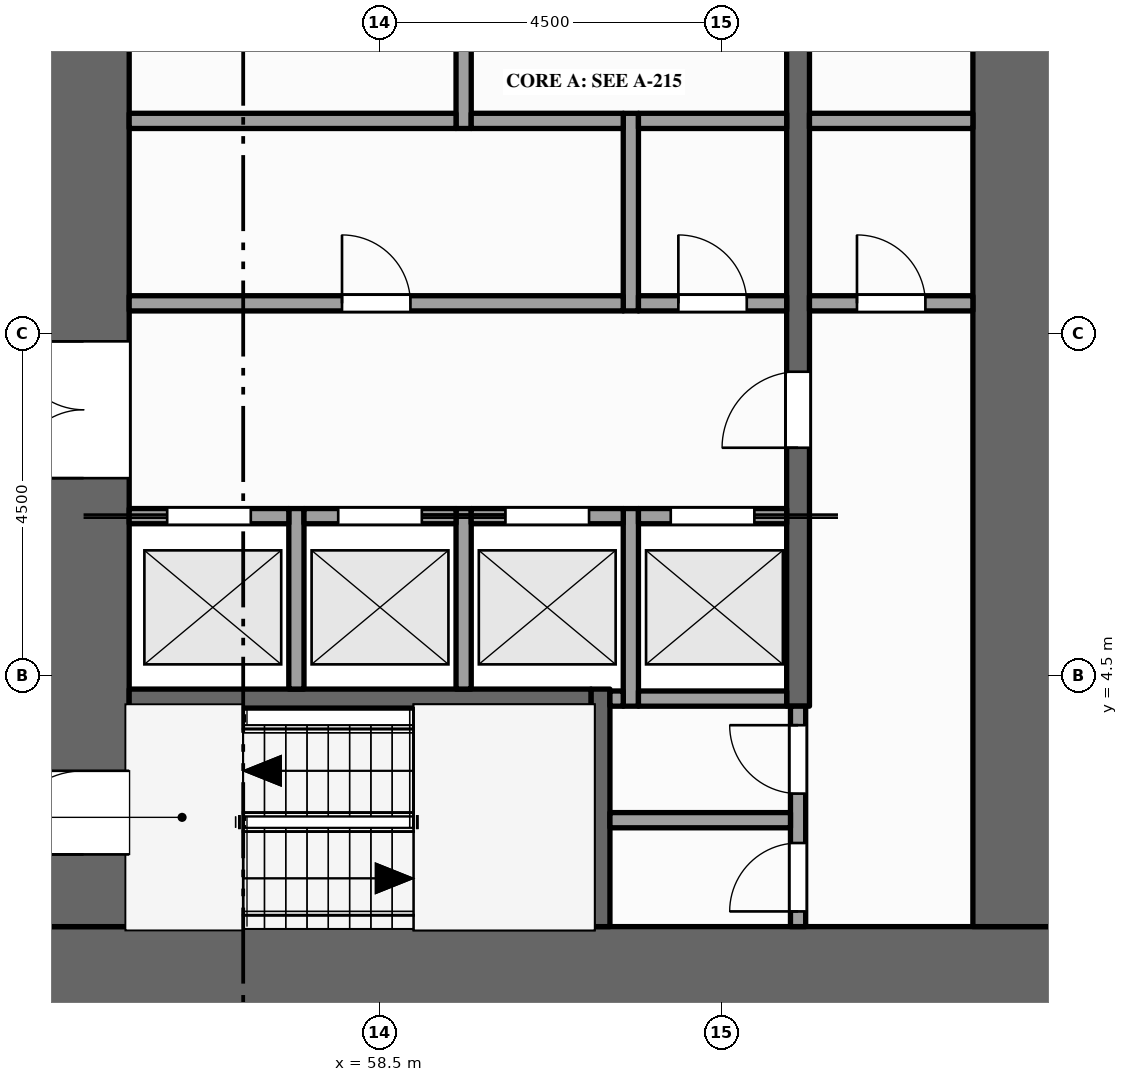
"""IFC4 building model, lengths in metres.
Left out: names, types, materials, properties, quantities, classifications, styles, units other than length and angle.
Written with IfcOpenShell. Run it as: python <this file> out.ifc"""

import sys

from ifc_helpers import new_model, si_unit, direction, frame, frame_2d, origin, place, context, subcontext, project, spatial, rectangle, extrude, element, fill, save


model = new_model("IFC4")
c1 = context("Model", 3, precision=1e-05, world=origin(), true_north=direction((0.0, 1.0)))
c2 = subcontext(c1, "Body", "Model", "MODEL_VIEW")
j1 = project(units=[si_unit("LENGTHUNIT", "METRE"), si_unit("PLANEANGLEUNIT", "RADIAN")], contexts=[c1])
p1 = place(None, origin())
s1 = spatial("IfcSite", under=j1, at=p1, CompositionType="ELEMENT")
p2 = place(p1, origin())
s2 = spatial("IfcBuilding", under=s1, at=p2, CompositionType="ELEMENT")
p3 = place(p2, frame((0.0, 0.0, 77.0)))
s3 = spatial("IfcBuildingStorey", under=s2, at=p3, CompositionType="ELEMENT", Elevation=77.0)
p4 = place(p3, frame((67.5, 0.6, -0.15), z_axis=(0.0, 0.0, 1.0), x_axis=(-1.0, 0.0, 0.0)))
e1 = element("IfcWall", 1, at=p4, inside=s3, PredefinedType="SHEAR", context=c2, shape_type="SweptSolid", body=[
    extrude(rectangle(XDim=13.5, YDim=1.2, at=frame_2d((6.75, 0.0))), origin(), (0.0, 0.0, 1.0), 6.0),
])
p5 = place(p3, frame((54.6, 1.2, -0.15), z_axis=(0.0, 0.0, 1.0), x_axis=(0.0, 1.0, 0.0)))
e2 = element("IfcWall", 2, at=p5, inside=s3, PredefinedType="SHEAR", context=c2, shape_type="SweptSolid", body=[
    extrude(rectangle(XDim=20.1, YDim=1.2, at=frame_2d((10.05, 0.0))), origin(), (0.0, 0.0, 1.0), 6.0),
])
p6 = place(p5, frame((5.9, 0.0, 0.15)))
e3 = element("IfcOpeningElement", 3, at=p6, cuts=e2, PredefinedType="OPENING", context=c2, shape_type="SweptSolid", body=[
    extrude(rectangle(XDim=1.8, YDim=2.1, at=frame_2d((0.9, 1.05))), frame((0.0, 0.61, 0.0), z_axis=(0.0, -1.0, 0.0), x_axis=(1.0, 0.0, 0.0)), (0.0, 0.0, 1.0), 1.22),
])
p7 = place(p5, frame((11.95, 0.0, 0.15)))
e4 = element("IfcOpeningElement", 4, at=p7, cuts=e2, PredefinedType="OPENING", context=c2, shape_type="SweptSolid", body=[
    extrude(rectangle(XDim=1.1, YDim=2.1, at=frame_2d((0.55, 1.05))), frame((0.0, 0.61, 0.0), z_axis=(0.0, -1.0, 0.0), x_axis=(1.0, 0.0, 0.0)), (0.0, 0.0, 1.0), 1.22),
])
p8 = place(p5, frame((0.95, 0.0, 0.15)))
e5 = element("IfcOpeningElement", 5, at=p8, cuts=e2, PredefinedType="OPENING", context=c2, shape_type="SweptSolid", body=[
    extrude(rectangle(XDim=1.1, YDim=2.1, at=frame_2d((0.55, 1.05))), frame((0.0, 0.61, 0.0), z_axis=(0.0, -1.0, 0.0), x_axis=(1.0, 0.0, 0.0)), (0.0, 0.0, 1.0), 1.22),
])
p9 = place(p5, frame((18.15, 0.0, 0.15)))
e6 = element("IfcOpeningElement", 6, at=p9, cuts=e2, PredefinedType="OPENING", context=c2, shape_type="SweptSolid", body=[
    extrude(rectangle(XDim=1.1, YDim=2.1, at=frame_2d((0.55, 1.05))), frame((0.0, 0.61, 0.0), z_axis=(0.0, -1.0, 0.0), x_axis=(1.0, 0.0, 0.0)), (0.0, 0.0, 1.0), 1.22),
])
p10 = place(p3, frame((66.9, 1.2, -0.15), z_axis=(0.0, 0.0, 1.0), x_axis=(0.0, 1.0, 0.0)))
e7 = element("IfcWall", 7, at=p10, inside=s3, PredefinedType="SHEAR", context=c2, shape_type="SweptSolid", body=[
    extrude(rectangle(XDim=20.1, YDim=1.2, at=frame_2d((10.05, 0.0))), origin(), (0.0, 0.0, 1.0), 6.0),
])
for number, where, z_axis, x_axis in (
    (8, (57.4, 4.325, 0.0), (0.0, 0.0, 1.0), (0.0, 1.0, 0.0)),
    (9, (59.6, 4.325, 0.0), (0.0, 0.0, 1.0), (0.0, 1.0, 0.0)),
):
    element("IfcWall", number, at=place(p3, frame(where, z_axis=z_axis, x_axis=x_axis)), inside=s3, PredefinedType="SOLIDWALL", context=c2, shape_type="SweptSolid", body=[
        extrude(rectangle(XDim=2.375, YDim=0.2, at=frame_2d((1.188, 0.0))), origin(), (0.0, 0.0, 1.0), 5.85),
    ])
p11 = place(p3, frame((59.6, 11.7, 0.0), z_axis=(0.0, 0.0, 1.0), x_axis=(0.0, 1.0, 0.0)))
e10 = element("IfcWall", 10, at=p11, inside=s3, PredefinedType="PARTITIONING", context=c2, shape_type="SweptSolid", body=[
    extrude(rectangle(XDim=3.8, YDim=0.2, at=frame_2d((1.9, 0.0))), origin(), (0.0, 0.0, 1.0), 5.85),
])
p12 = place(p11, frame((1.5, 0.0, 0.0)))
e11 = element("IfcOpeningElement", 11, at=p12, cuts=e10, PredefinedType="OPENING", context=c2, shape_type="SweptSolid", body=[
    extrude(rectangle(XDim=1.0, YDim=2.1, at=frame_2d((0.5, 1.05))), frame((0.0, 0.11, 0.0), z_axis=(0.0, -1.0, 0.0), x_axis=(1.0, 0.0, 0.0)), (0.0, 0.0, 1.0), 0.22),
])
p13 = place(p3, frame((61.4, 1.2, 0.0), z_axis=(0.0, 0.0, 1.0), x_axis=(0.0, 1.0, 0.0)))
e12 = element("IfcWall", 12, at=p13, inside=s3, PredefinedType="SHEAR", context=c2, shape_type="SweptSolid", body=[
    extrude(rectangle(XDim=3.125, YDim=0.25, at=frame_2d((1.562, 0.0))), origin(), (0.0, 0.0, 1.0), 5.85),
])
p14 = place(p3, frame((61.8, 4.1, 0.0), z_axis=(0.0, 0.0, 1.0), x_axis=(0.0, 1.0, 0.0)))
e13 = element("IfcWall", 13, at=p14, inside=s3, PredefinedType="SOLIDWALL", context=c2, shape_type="SweptSolid", body=[
    extrude(rectangle(XDim=2.6, YDim=0.2, at=frame_2d((1.3, 0.0))), origin(), (0.0, 0.0, 1.0), 5.85),
])
p15 = place(p3, frame((61.8, 9.3, 0.0), z_axis=(0.0, 0.0, 1.0), x_axis=(0.0, 1.0, 0.0)))
e14 = element("IfcWall", 14, at=p15, inside=s3, PredefinedType="PARTITIONING", context=c2, shape_type="SweptSolid", body=[
    extrude(rectangle(XDim=2.6, YDim=0.2, at=frame_2d((1.3, 0.0))), origin(), (0.0, 0.0, 1.0), 5.85),
])
p16 = place(p3, frame((64.0, 1.2, 0.0), z_axis=(0.0, 0.0, 1.0), x_axis=(0.0, 1.0, 0.0)))
e15 = element("IfcWall", 15, at=p16, inside=s3, PredefinedType="PARTITIONING", context=c2, shape_type="SweptSolid", body=[
    extrude(rectangle(XDim=2.9, YDim=0.2, at=frame_2d((1.45, 0.0))), origin(), (0.0, 0.0, 1.0), 5.85),
])
p17 = place(p16, frame((0.2, 0.0, 0.0)))
e16 = element("IfcOpeningElement", 16, at=p17, cuts=e15, PredefinedType="OPENING", context=c2, shape_type="SweptSolid", body=[
    extrude(rectangle(XDim=0.9, YDim=2.1, at=frame_2d((0.45, 1.05))), frame((0.0, 0.11, 0.0), z_axis=(0.0, -1.0, 0.0), x_axis=(1.0, 0.0, 0.0)), (0.0, 0.0, 1.0), 0.22),
])
p18 = place(p16, frame((1.75, 0.0, 0.0)))
e17 = element("IfcOpeningElement", 17, at=p18, cuts=e15, PredefinedType="OPENING", context=c2, shape_type="SweptSolid", body=[
    extrude(rectangle(XDim=0.9, YDim=2.1, at=frame_2d((0.45, 1.05))), frame((0.0, 0.11, 0.0), z_axis=(0.0, -1.0, 0.0), x_axis=(1.0, 0.0, 0.0)), (0.0, 0.0, 1.0), 0.22),
])
p19 = place(p3, frame((64.0, 4.1, 0.0), z_axis=(0.0, 0.0, 1.0), x_axis=(0.0, 1.0, 0.0)))
e18 = element("IfcWall", 18, at=p19, inside=s3, PredefinedType="SHEAR", context=c2, shape_type="SweptSolid", body=[
    extrude(rectangle(XDim=14.5, YDim=0.3, at=frame_2d((7.25, 0.0))), origin(), (0.0, 0.0, 1.0), 5.85),
])
p20 = place(p19, frame((3.4, 0.0, 0.0)))
e19 = element("IfcOpeningElement", 19, at=p20, cuts=e18, PredefinedType="OPENING", context=c2, shape_type="SweptSolid", body=[
    extrude(rectangle(XDim=1.0, YDim=2.1, at=frame_2d((0.5, 1.05))), frame((0.0, 0.16, 0.0), z_axis=(0.0, -1.0, 0.0), x_axis=(1.0, 0.0, 0.0)), (0.0, 0.0, 1.0), 0.32),
])
p21 = place(p19, frame((9.1, 0.0, 0.0)))
e20 = element("IfcOpeningElement", 20, at=p21, cuts=e18, PredefinedType="OPENING", context=c2, shape_type="SweptSolid", body=[
    extrude(rectangle(XDim=1.0, YDim=2.1, at=frame_2d((0.5, 1.05))), frame((0.0, 0.16, 0.0), z_axis=(0.0, -1.0, 0.0), x_axis=(1.0, 0.0, 0.0)), (0.0, 0.0, 1.0), 0.32),
])
p22 = place(p3, frame((61.525, 2.6, 0.0), z_axis=(0.0, 0.0, 1.0), x_axis=(1.0, 0.0, 0.0)))
e21 = element("IfcWall", 21, at=p22, inside=s3, PredefinedType="PARTITIONING", context=c2, shape_type="SweptSolid", body=[
    extrude(rectangle(XDim=2.375, YDim=0.2, at=frame_2d((1.188, 0.0))), origin(), (0.0, 0.0, 1.0), 5.85),
])
p23 = place(p3, frame((55.2, 4.2, 0.0), z_axis=(0.0, 0.0, 1.0), x_axis=(1.0, 0.0, 0.0)))
e22 = element("IfcWall", 22, at=p23, inside=s3, PredefinedType="SHEAR", context=c2, shape_type="SweptSolid", body=[
    extrude(rectangle(XDim=6.075, YDim=0.25, at=frame_2d((3.038, 0.0))), origin(), (0.0, 0.0, 1.0), 5.85),
])
p24 = place(p3, frame((61.525, 4.2, 0.0), z_axis=(0.0, 0.0, 1.0), x_axis=(1.0, 0.0, 0.0)))
e23 = element("IfcWall", 23, at=p24, inside=s3, PredefinedType="SOLIDWALL", context=c2, shape_type="SweptSolid", body=[
    extrude(rectangle(XDim=0.175, YDim=0.2, at=frame_2d((0.087, 0.0))), origin(), (0.0, 0.0, 1.0), 5.85),
])
p25 = place(p3, frame((61.9, 4.2, 0.0), z_axis=(0.0, 0.0, 1.0), x_axis=(1.0, 0.0, 0.0)))
e24 = element("IfcWall", 24, at=p25, inside=s3, PredefinedType="SOLIDWALL", context=c2, shape_type="SweptSolid", body=[
    extrude(rectangle(XDim=1.95, YDim=0.2, at=frame_2d((0.975, 0.0))), origin(), (0.0, 0.0, 1.0), 5.85),
])
p26 = place(p3, frame((55.2, 6.6, 0.0), z_axis=(0.0, 0.0, 1.0), x_axis=(1.0, 0.0, 0.0)))
e25 = element("IfcWall", 25, at=p26, inside=s3, PredefinedType="SOLIDWALL", context=c2, shape_type="SweptSolid", body=[
    extrude(rectangle(XDim=2.1, YDim=0.2, at=frame_2d((1.05, 0.0))), origin(), (0.0, 0.0, 1.0), 5.85),
])
p27 = place(p26, frame((0.5, 0.0, 0.012)))
e26 = element("IfcOpeningElement", 26, at=p27, cuts=e25, PredefinedType="OPENING", context=c2, shape_type="SweptSolid", body=[
    extrude(rectangle(XDim=1.1, YDim=2.1, at=frame_2d((0.55, 1.05))), frame((0.0, 0.11, 0.0), z_axis=(0.0, -1.0, 0.0), x_axis=(1.0, 0.0, 0.0)), (0.0, 0.0, 1.0), 0.22),
])
p28 = place(p3, frame((57.5, 6.6, 0.0), z_axis=(0.0, 0.0, 1.0), x_axis=(1.0, 0.0, 0.0)))
e27 = element("IfcWall", 27, at=p28, inside=s3, PredefinedType="SOLIDWALL", context=c2, shape_type="SweptSolid", body=[
    extrude(rectangle(XDim=2.0, YDim=0.2, at=frame_2d((1.0, 0.0))), origin(), (0.0, 0.0, 1.0), 5.85),
])
p29 = place(p28, frame((0.45, 0.0, 0.012)))
e28 = element("IfcOpeningElement", 28, at=p29, cuts=e27, PredefinedType="OPENING", context=c2, shape_type="SweptSolid", body=[
    extrude(rectangle(XDim=1.1, YDim=2.1, at=frame_2d((0.55, 1.05))), frame((0.0, 0.11, 0.0), z_axis=(0.0, -1.0, 0.0), x_axis=(1.0, 0.0, 0.0)), (0.0, 0.0, 1.0), 0.22),
])
p30 = place(p3, frame((59.7, 6.6, 0.0), z_axis=(0.0, 0.0, 1.0), x_axis=(1.0, 0.0, 0.0)))
e29 = element("IfcWall", 29, at=p30, inside=s3, PredefinedType="SOLIDWALL", context=c2, shape_type="SweptSolid", body=[
    extrude(rectangle(XDim=2.0, YDim=0.2, at=frame_2d((1.0, 0.0))), origin(), (0.0, 0.0, 1.0), 5.85),
])
p31 = place(p30, frame((0.45, 0.0, 0.012)))
e30 = element("IfcOpeningElement", 30, at=p31, cuts=e29, PredefinedType="OPENING", context=c2, shape_type="SweptSolid", body=[
    extrude(rectangle(XDim=1.1, YDim=2.1, at=frame_2d((0.55, 1.05))), frame((0.0, 0.11, 0.0), z_axis=(0.0, -1.0, 0.0), x_axis=(1.0, 0.0, 0.0)), (0.0, 0.0, 1.0), 0.22),
])
p32 = place(p3, frame((61.9, 6.6, 0.0), z_axis=(0.0, 0.0, 1.0), x_axis=(1.0, 0.0, 0.0)))
e31 = element("IfcWall", 31, at=p32, inside=s3, PredefinedType="SOLIDWALL", context=c2, shape_type="SweptSolid", body=[
    extrude(rectangle(XDim=1.95, YDim=0.2, at=frame_2d((0.975, 0.0))), origin(), (0.0, 0.0, 1.0), 5.85),
])
p33 = place(p32, frame((0.425, 0.0, 0.012)))
e32 = element("IfcOpeningElement", 32, at=p33, cuts=e31, PredefinedType="OPENING", context=c2, shape_type="SweptSolid", body=[
    extrude(rectangle(XDim=1.1, YDim=2.1, at=frame_2d((0.55, 1.05))), frame((0.0, 0.11, 0.0), z_axis=(0.0, -1.0, 0.0), x_axis=(1.0, 0.0, 0.0)), (0.0, 0.0, 1.0), 0.22),
])
p34 = place(p3, frame((55.2, 9.4, 0.0), z_axis=(0.0, 0.0, 1.0), x_axis=(1.0, 0.0, 0.0)))
e33 = element("IfcWall", 33, at=p34, inside=s3, PredefinedType="PARTITIONING", context=c2, shape_type="SweptSolid", body=[
    extrude(rectangle(XDim=6.5, YDim=0.2, at=frame_2d((3.25, 0.0))), origin(), (0.0, 0.0, 1.0), 5.85),
])
p35 = place(p34, frame((2.8, 0.0, 0.0)))
e34 = element("IfcOpeningElement", 34, at=p35, cuts=e33, PredefinedType="OPENING", context=c2, shape_type="SweptSolid", body=[
    extrude(rectangle(XDim=0.9, YDim=2.1, at=frame_2d((0.45, 1.05))), frame((0.0, 0.11, 0.0), z_axis=(0.0, -1.0, 0.0), x_axis=(1.0, 0.0, 0.0)), (0.0, 0.0, 1.0), 0.22),
])
p36 = place(p3, frame((61.9, 9.4, 0.0), z_axis=(0.0, 0.0, 1.0), x_axis=(1.0, 0.0, 0.0)))
e35 = element("IfcWall", 35, at=p36, inside=s3, PredefinedType="PARTITIONING", context=c2, shape_type="SweptSolid", body=[
    extrude(rectangle(XDim=1.95, YDim=0.2, at=frame_2d((0.975, 0.0))), origin(), (0.0, 0.0, 1.0), 5.85),
])
p37 = place(p36, frame((0.525, 0.0, 0.0)))
e36 = element("IfcOpeningElement", 36, at=p37, cuts=e35, PredefinedType="OPENING", context=c2, shape_type="SweptSolid", body=[
    extrude(rectangle(XDim=0.9, YDim=2.1, at=frame_2d((0.45, 1.05))), frame((0.0, 0.11, 0.0), z_axis=(0.0, -1.0, 0.0), x_axis=(1.0, 0.0, 0.0)), (0.0, 0.0, 1.0), 0.22),
])
p38 = place(p3, frame((64.15, 9.4, 0.0), z_axis=(0.0, 0.0, 1.0), x_axis=(1.0, 0.0, 0.0)))
e37 = element("IfcWall", 37, at=p38, inside=s3, PredefinedType="PARTITIONING", context=c2, shape_type="SweptSolid", body=[
    extrude(rectangle(XDim=2.15, YDim=0.2, at=frame_2d((1.075, 0.0))), origin(), (0.0, 0.0, 1.0), 5.85),
])
p39 = place(p38, frame((0.625, 0.0, 0.0)))
e38 = element("IfcOpeningElement", 38, at=p39, cuts=e37, PredefinedType="OPENING", context=c2, shape_type="SweptSolid", body=[
    extrude(rectangle(XDim=0.9, YDim=2.1, at=frame_2d((0.45, 1.05))), frame((0.0, 0.11, 0.0), z_axis=(0.0, -1.0, 0.0), x_axis=(1.0, 0.0, 0.0)), (0.0, 0.0, 1.0), 0.22),
])
p40 = place(p3, frame((55.2, 11.8, 0.0), z_axis=(0.0, 0.0, 1.0), x_axis=(1.0, 0.0, 0.0)))
e39 = element("IfcWall", 39, at=p40, inside=s3, PredefinedType="PARTITIONING", context=c2, shape_type="SweptSolid", body=[
    extrude(rectangle(XDim=4.3, YDim=0.2, at=frame_2d((2.15, 0.0))), origin(), (0.0, 0.0, 1.0), 5.85),
])
p41 = place(p3, frame((59.7, 11.8, 0.0), z_axis=(0.0, 0.0, 1.0), x_axis=(1.0, 0.0, 0.0)))
e40 = element("IfcWall", 40, at=p41, inside=s3, PredefinedType="PARTITIONING", context=c2, shape_type="SweptSolid", body=[
    extrude(rectangle(XDim=2.0, YDim=0.2, at=frame_2d((1.0, 0.0))), origin(), (0.0, 0.0, 1.0), 5.85),
])
p42 = place(p3, frame((61.9, 11.8, 0.0), z_axis=(0.0, 0.0, 1.0), x_axis=(1.0, 0.0, 0.0)))
e41 = element("IfcWall", 41, at=p42, inside=s3, PredefinedType="PARTITIONING", context=c2, shape_type="SweptSolid", body=[
    extrude(rectangle(XDim=1.95, YDim=0.2, at=frame_2d((0.975, 0.0))), origin(), (0.0, 0.0, 1.0), 5.85),
])
p43 = place(p3, frame((64.15, 11.8, 0.0), z_axis=(0.0, 0.0, 1.0), x_axis=(1.0, 0.0, 0.0)))
e42 = element("IfcWall", 42, at=p43, inside=s3, PredefinedType="PARTITIONING", context=c2, shape_type="SweptSolid", body=[
    extrude(rectangle(XDim=2.15, YDim=0.2, at=frame_2d((1.075, 0.0))), origin(), (0.0, 0.0, 1.0), 5.85),
])
p44 = place(p27, origin())
e43 = element("IfcDoor", 43, at=p44, inside=s3, OperationType="SLIDING_TO_LEFT", PredefinedType="DOOR", context=c2, shape_type="SweptSolid", body=[
    extrude(rectangle(XDim=1.1, YDim=2.1, at=frame_2d((0.55, 1.05))), frame((0.0, 0.025, 0.0), z_axis=(0.0, -1.0, 0.0), x_axis=(1.0, 0.0, 0.0)), (0.0, 0.0, 1.0), 0.05),
])
fill(e26, e43)
p45 = place(p29, origin())
e44 = element("IfcDoor", 44, at=p45, inside=s3, OperationType="SLIDING_TO_RIGHT", PredefinedType="DOOR", context=c2, shape_type="SweptSolid", body=[
    extrude(rectangle(XDim=1.1, YDim=2.1, at=frame_2d((0.55, 1.05))), frame((0.0, 0.025, 0.0), z_axis=(0.0, -1.0, 0.0), x_axis=(1.0, 0.0, 0.0)), (0.0, 0.0, 1.0), 0.05),
])
fill(e28, e44)
p46 = place(p31, origin())
e45 = element("IfcDoor", 45, at=p46, inside=s3, OperationType="SLIDING_TO_LEFT", PredefinedType="DOOR", context=c2, shape_type="SweptSolid", body=[
    extrude(rectangle(XDim=1.1, YDim=2.1, at=frame_2d((0.55, 1.05))), frame((0.0, 0.025, 0.0), z_axis=(0.0, -1.0, 0.0), x_axis=(1.0, 0.0, 0.0)), (0.0, 0.0, 1.0), 0.05),
])
fill(e30, e45)
p47 = place(p33, origin())
e46 = element("IfcDoor", 46, at=p47, inside=s3, OperationType="SLIDING_TO_RIGHT", PredefinedType="DOOR", context=c2, shape_type="SweptSolid", body=[
    extrude(rectangle(XDim=1.1, YDim=2.1, at=frame_2d((0.55, 1.05))), frame((0.0, 0.025, 0.0), z_axis=(0.0, -1.0, 0.0), x_axis=(1.0, 0.0, 0.0)), (0.0, 0.0, 1.0), 0.05),
])
fill(e32, e46)
p48 = place(p6, origin())
e47 = element("IfcDoor", 47, at=p48, inside=s3, OperationType="DOUBLE_DOOR_SINGLE_SWING", PredefinedType="DOOR", context=c2, shape_type="SweptSolid", body=[
    extrude(rectangle(XDim=1.8, YDim=2.1, at=frame_2d((0.9, 1.05))), frame((0.0, 0.025, 0.0), z_axis=(0.0, -1.0, 0.0), x_axis=(1.0, 0.0, 0.0)), (0.0, 0.0, 1.0), 0.05),
])
fill(e3, e47)
p49 = place(p20, origin())
e48 = element("IfcDoor", 48, at=p49, inside=s3, OperationType="SINGLE_SWING_LEFT", PredefinedType="DOOR", context=c2, shape_type="SweptSolid", body=[
    extrude(rectangle(XDim=1.0, YDim=2.1, at=frame_2d((0.5, 1.05))), frame((0.0, 0.025, 0.0), z_axis=(0.0, -1.0, 0.0), x_axis=(1.0, 0.0, 0.0)), (0.0, 0.0, 1.0), 0.05),
])
fill(e19, e48)
p50 = place(p39, origin())
e49 = element("IfcDoor", 49, at=p50, inside=s3, OperationType="SINGLE_SWING_LEFT", PredefinedType="DOOR", context=c2, shape_type="SweptSolid", body=[
    extrude(rectangle(XDim=0.9, YDim=2.1, at=frame_2d((0.45, 1.05))), frame((0.0, 0.025, 0.0), z_axis=(0.0, -1.0, 0.0), x_axis=(1.0, 0.0, 0.0)), (0.0, 0.0, 1.0), 0.05),
])
fill(e38, e49)
p51 = place(p8, origin())
e50 = element("IfcDoor", 50, at=p51, inside=s3, OperationType="SINGLE_SWING_LEFT", PredefinedType="DOOR", context=c2, shape_type="SweptSolid", body=[
    extrude(rectangle(XDim=1.1, YDim=2.1, at=frame_2d((0.55, 1.05))), frame((0.0, 0.025, 0.0), z_axis=(0.0, -1.0, 0.0), x_axis=(1.0, 0.0, 0.0)), (0.0, 0.0, 1.0), 0.05),
])
fill(e5, e50)
p52 = place(p17, origin())
e51 = element("IfcDoor", 51, at=p52, inside=s3, OperationType="SINGLE_SWING_LEFT", PredefinedType="DOOR", context=c2, shape_type="SweptSolid", body=[
    extrude(rectangle(XDim=0.9, YDim=2.1, at=frame_2d((0.45, 1.05))), frame((0.0, 0.025, 0.0), z_axis=(0.0, -1.0, 0.0), x_axis=(1.0, 0.0, 0.0)), (0.0, 0.0, 1.0), 0.05),
])
fill(e16, e51)
p53 = place(p18, origin())
e52 = element("IfcDoor", 52, at=p53, inside=s3, OperationType="SINGLE_SWING_RIGHT", PredefinedType="DOOR", context=c2, shape_type="SweptSolid", body=[
    extrude(rectangle(XDim=0.9, YDim=2.1, at=frame_2d((0.45, 1.05))), frame((0.0, 0.025, 0.0), z_axis=(0.0, -1.0, 0.0), x_axis=(1.0, 0.0, 0.0)), (0.0, 0.0, 1.0), 0.05),
])
fill(e17, e52)
p54 = place(p35, origin())
e53 = element("IfcDoor", 53, at=p54, inside=s3, OperationType="SINGLE_SWING_LEFT", PredefinedType="DOOR", context=c2, shape_type="SweptSolid", body=[
    extrude(rectangle(XDim=0.9, YDim=2.1, at=frame_2d((0.45, 1.05))), frame((0.0, 0.025, 0.0), z_axis=(0.0, -1.0, 0.0), x_axis=(1.0, 0.0, 0.0)), (0.0, 0.0, 1.0), 0.05),
])
fill(e34, e53)
p55 = place(p37, origin())
e54 = element("IfcDoor", 54, at=p55, inside=s3, OperationType="SINGLE_SWING_LEFT", PredefinedType="DOOR", context=c2, shape_type="SweptSolid", body=[
    extrude(rectangle(XDim=0.9, YDim=2.1, at=frame_2d((0.45, 1.05))), frame((0.0, 0.025, 0.0), z_axis=(0.0, -1.0, 0.0), x_axis=(1.0, 0.0, 0.0)), (0.0, 0.0, 1.0), 0.05),
])
fill(e36, e54)
save(model, sys.argv[1])
